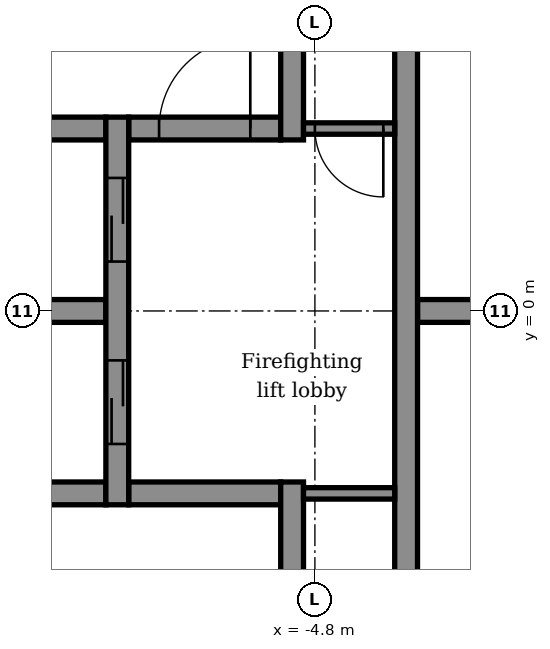
"""IFC4 building model, lengths in metres.
Left out: names, types, materials, properties, quantities, classifications, styles, units other than length and angle.
Written with IfcOpenShell. Run it as: python <this file> out.ifc"""

import sys

from ifc_helpers import new_model, si_unit, direction, frame, frame_2d, origin, place, context, subcontext, project, spatial, rectangle, extrude, element, fill, save


model = new_model("IFC4")
c1 = context("Model", 3, precision=1e-05, world=origin(), true_north=direction((0.0, 1.0)))
c2 = subcontext(c1, "Body", "Model", "MODEL_VIEW")
j1 = project(units=[si_unit("LENGTHUNIT", "METRE"), si_unit("PLANEANGLEUNIT", "RADIAN")], contexts=[c1])
p1 = place(None, origin())
s1 = spatial("IfcSite", under=j1, at=p1, CompositionType="ELEMENT")
p2 = place(p1, origin())
s2 = spatial("IfcBuilding", under=s1, at=p2, CompositionType="ELEMENT")
p3 = place(p2, frame((0.0, 0.0, 285.2)))
s3 = spatial("IfcBuildingStorey", under=s2, at=p3, CompositionType="ELEMENT", Elevation=285.2)
p4 = place(p3, frame((-9.45, -2.4, -0.15), z_axis=(0.0, 0.0, 1.0), x_axis=(1.0, 0.0, 0.0)))
e1 = element("IfcWall", 1, at=p4, inside=s3, PredefinedType="STANDARD", context=c2, shape_type="SweptSolid", body=[
    extrude(rectangle(XDim=1.9, YDim=0.3, at=frame_2d((0.95, 0.0))), origin(), (0.0, 0.0, 1.0), 3.9),
])
p5 = place(p3, frame((-7.25, -2.4, -0.15), z_axis=(0.0, 0.0, 1.0), x_axis=(1.0, 0.0, 0.0)))
e2 = element("IfcWall", 2, at=p5, inside=s3, PredefinedType="STANDARD", context=c2, shape_type="SweptSolid", body=[
    extrude(rectangle(XDim=2.0, YDim=0.3, at=frame_2d((1.0, 0.0))), origin(), (0.0, 0.0, 1.0), 3.9),
])
p6 = place(p3, frame((-10.85, 0.0, -0.15), z_axis=(0.0, 0.0, 1.0), x_axis=(1.0, 0.0, 0.0)))
e3 = element("IfcWall", 3, at=p6, inside=s3, PredefinedType="STANDARD", context=c2, shape_type="SweptSolid", body=[
    extrude(rectangle(XDim=3.3, YDim=0.3, at=frame_2d((1.65, 0.0))), origin(), (0.0, 0.0, 1.0), 3.9),
])
p7 = place(p3, frame((-3.45, 0.0, -0.15), z_axis=(0.0, 0.0, 1.0), x_axis=(1.0, 0.0, 0.0)))
e4 = element("IfcWall", 4, at=p7, inside=s3, PredefinedType="STANDARD", context=c2, shape_type="SweptSolid", body=[
    extrude(rectangle(XDim=2.1, YDim=0.3, at=frame_2d((1.05, 0.0))), origin(), (0.0, 0.0, 1.0), 3.9),
])
p8 = place(p3, frame((-9.45, 2.4, -0.15), z_axis=(0.0, 0.0, 1.0), x_axis=(1.0, 0.0, 0.0)))
e5 = element("IfcWall", 5, at=p8, inside=s3, PredefinedType="STANDARD", context=c2, shape_type="SweptSolid", body=[
    extrude(rectangle(XDim=1.9, YDim=0.3, at=frame_2d((0.95, 0.0))), origin(), (0.0, 0.0, 1.0), 3.9),
])
p9 = place(p3, frame((-7.25, 2.4, -0.15), z_axis=(0.0, 0.0, 1.0), x_axis=(1.0, 0.0, 0.0)))
e6 = element("IfcWall", 6, at=p9, inside=s3, PredefinedType="STANDARD", context=c2, shape_type="SweptSolid", body=[
    extrude(rectangle(XDim=2.0, YDim=0.3, at=frame_2d((1.0, 0.0))), origin(), (0.0, 0.0, 1.0), 3.9),
])
p10 = place(p9, frame((0.4, 0.0, 0.15)))
e7 = element("IfcOpeningElement", 7, at=p10, cuts=e6, PredefinedType="OPENING", context=c2, shape_type="SweptSolid", body=[
    extrude(rectangle(XDim=1.2, YDim=2.1, at=frame_2d((0.6, 1.05))), frame((0.0, 0.16, 0.0), z_axis=(0.0, -1.0, 0.0), x_axis=(1.0, 0.0, 0.0)), (0.0, 0.0, 1.0), 0.32),
])
p11 = place(p3, frame((-7.4, -2.55, -0.15), z_axis=(0.0, 0.0, 1.0), x_axis=(0.0, 1.0, 0.0)))
e8 = element("IfcWall", 8, at=p11, inside=s3, PredefinedType="STANDARD", context=c2, shape_type="SweptSolid", body=[
    extrude(rectangle(XDim=5.1, YDim=0.3, at=frame_2d((2.55, 0.0))), origin(), (0.0, 0.0, 1.0), 3.9),
])
p12 = place(p11, frame((0.8, 0.0, 0.15)))
e9 = element("IfcOpeningElement", 9, at=p12, cuts=e8, PredefinedType="OPENING", context=c2, shape_type="SweptSolid", body=[
    extrude(rectangle(XDim=1.1, YDim=2.1, at=frame_2d((0.55, 1.05))), frame((0.0, 0.16, 0.0), z_axis=(0.0, -1.0, 0.0), x_axis=(1.0, 0.0, 0.0)), (0.0, 0.0, 1.0), 0.32),
])
p13 = place(p11, frame((3.2, 0.0, 0.15)))
e10 = element("IfcOpeningElement", 10, at=p13, cuts=e8, PredefinedType="OPENING", context=c2, shape_type="SweptSolid", body=[
    extrude(rectangle(XDim=1.1, YDim=2.1, at=frame_2d((0.55, 1.05))), frame((0.0, 0.16, 0.0), z_axis=(0.0, -1.0, 0.0), x_axis=(1.0, 0.0, 0.0)), (0.0, 0.0, 1.0), 0.32),
])
p14 = place(p3, frame((-5.1, -9.325, -0.15), z_axis=(0.0, 0.0, 1.0), x_axis=(0.0, 1.0, 0.0)))
e11 = element("IfcWall", 11, at=p14, inside=s3, PredefinedType="STANDARD", context=c2, shape_type="SweptSolid", body=[
    extrude(rectangle(XDim=7.075, YDim=0.3, at=frame_2d((3.538, 0.0))), origin(), (0.0, 0.0, 1.0), 3.9),
])
p15 = place(p14, frame((3.875, 0.0, 0.15)))
e12 = element("IfcOpeningElement", 12, at=p15, cuts=e11, PredefinedType="OPENING", context=c2, shape_type="SweptSolid", body=[
    extrude(rectangle(XDim=1.2, YDim=2.1, at=frame_2d((0.6, 1.05))), frame((0.0, 0.16, 0.0), z_axis=(0.0, -1.0, 0.0), x_axis=(1.0, 0.0, 0.0)), (0.0, 0.0, 1.0), 0.32),
])
p16 = place(p3, frame((-5.1, 2.25, -0.15), z_axis=(0.0, 0.0, 1.0), x_axis=(0.0, 1.0, 0.0)))
e13 = element("IfcWall", 13, at=p16, inside=s3, PredefinedType="STANDARD", context=c2, shape_type="SweptSolid", body=[
    extrude(rectangle(XDim=7.075, YDim=0.3, at=frame_2d((3.538, 0.0))), origin(), (0.0, 0.0, 1.0), 3.9),
])
p17 = place(p16, frame((2.0, 0.0, 0.15)))
e14 = element("IfcOpeningElement", 14, at=p17, cuts=e13, PredefinedType="OPENING", context=c2, shape_type="SweptSolid", body=[
    extrude(rectangle(XDim=1.2, YDim=2.1, at=frame_2d((0.6, 1.05))), frame((0.0, 0.16, 0.0), z_axis=(0.0, -1.0, 0.0), x_axis=(1.0, 0.0, 0.0)), (0.0, 0.0, 1.0), 0.32),
])
p18 = place(p3, frame((-3.6, -3.75, -0.15), z_axis=(0.0, 0.0, 1.0), x_axis=(0.0, 1.0, 0.0)))
e15 = element("IfcWall", 15, at=p18, inside=s3, PredefinedType="STANDARD", context=c2, shape_type="SweptSolid", body=[
    extrude(rectangle(XDim=7.5, YDim=0.3, at=frame_2d((3.75, 0.0))), origin(), (0.0, 0.0, 1.0), 3.9),
])
p19 = place(p3, frame((-4.95, 2.4, 0.0), z_axis=(0.0, 0.0, 1.0), x_axis=(1.0, 0.0, 0.0)))
e16 = element("IfcWall", 16, at=p19, inside=s3, PredefinedType="PARTITIONING", context=c2, shape_type="SweptSolid", body=[
    extrude(rectangle(XDim=1.2, YDim=0.15, at=frame_2d((0.6, 0.0))), origin(), (0.0, 0.0, 1.0), 3.75),
])
p20 = place(p19, frame((0.15, 0.0, 0.0)))
e17 = element("IfcOpeningElement", 17, at=p20, cuts=e16, PredefinedType="OPENING", context=c2, shape_type="SweptSolid", body=[
    extrude(rectangle(XDim=0.9, YDim=2.1, at=frame_2d((0.45, 1.05))), frame((0.0, 0.085, 0.0), z_axis=(0.0, -1.0, 0.0), x_axis=(1.0, 0.0, 0.0)), (0.0, 0.0, 1.0), 0.17),
])
p21 = place(p3, frame((-4.95, -2.4, 0.0), z_axis=(0.0, 0.0, 1.0), x_axis=(1.0, 0.0, 0.0)))
e18 = element("IfcWall", 18, at=p21, inside=s3, PredefinedType="PARTITIONING", context=c2, shape_type="SweptSolid", body=[
    extrude(rectangle(XDim=1.2, YDim=0.15, at=frame_2d((0.6, 0.0))), origin(), (0.0, 0.0, 1.0), 3.75),
])
p22 = place(p12, origin())
e19 = element("IfcDoor", 19, at=p22, inside=s3, OperationType="DOUBLE_DOOR_SLIDING", PredefinedType="DOOR", context=c2, shape_type="SweptSolid", body=[
    extrude(rectangle(XDim=1.1, YDim=2.1, at=frame_2d((0.55, 1.05))), frame((0.0, 0.025, 0.0), z_axis=(0.0, -1.0, 0.0), x_axis=(1.0, 0.0, 0.0)), (0.0, 0.0, 1.0), 0.05),
])
fill(e9, e19)
p23 = place(p13, origin())
e20 = element("IfcDoor", 20, at=p23, inside=s3, OperationType="DOUBLE_DOOR_SLIDING", PredefinedType="DOOR", context=c2, shape_type="SweptSolid", body=[
    extrude(rectangle(XDim=1.1, YDim=2.1, at=frame_2d((0.55, 1.05))), frame((0.0, 0.025, 0.0), z_axis=(0.0, -1.0, 0.0), x_axis=(1.0, 0.0, 0.0)), (0.0, 0.0, 1.0), 0.05),
])
fill(e10, e20)
p24 = place(p20, frame((0.9, 0.0, 0.0), z_axis=(0.0, 0.0, 1.0), x_axis=(-1.0, 0.0, 0.0)))
e21 = element("IfcDoor", 21, at=p24, inside=s3, OperationType="SINGLE_SWING_RIGHT", PredefinedType="DOOR", context=c2, shape_type="SweptSolid", body=[
    extrude(rectangle(XDim=0.9, YDim=2.1, at=frame_2d((0.45, 1.05))), frame((0.0, 0.025, 0.0), z_axis=(0.0, -1.0, 0.0), x_axis=(1.0, 0.0, 0.0)), (0.0, 0.0, 1.0), 0.05),
])
fill(e17, e21)
p25 = place(p10, origin())
e22 = element("IfcDoor", 22, at=p25, inside=s3, OperationType="SINGLE_SWING_RIGHT", PredefinedType="DOOR", context=c2, shape_type="SweptSolid", body=[
    extrude(rectangle(XDim=1.2, YDim=2.1, at=frame_2d((0.6, 1.05))), frame((0.0, 0.025, 0.0), z_axis=(0.0, -1.0, 0.0), x_axis=(1.0, 0.0, 0.0)), (0.0, 0.0, 1.0), 0.05),
])
fill(e7, e22)
save(model, sys.argv[1])
